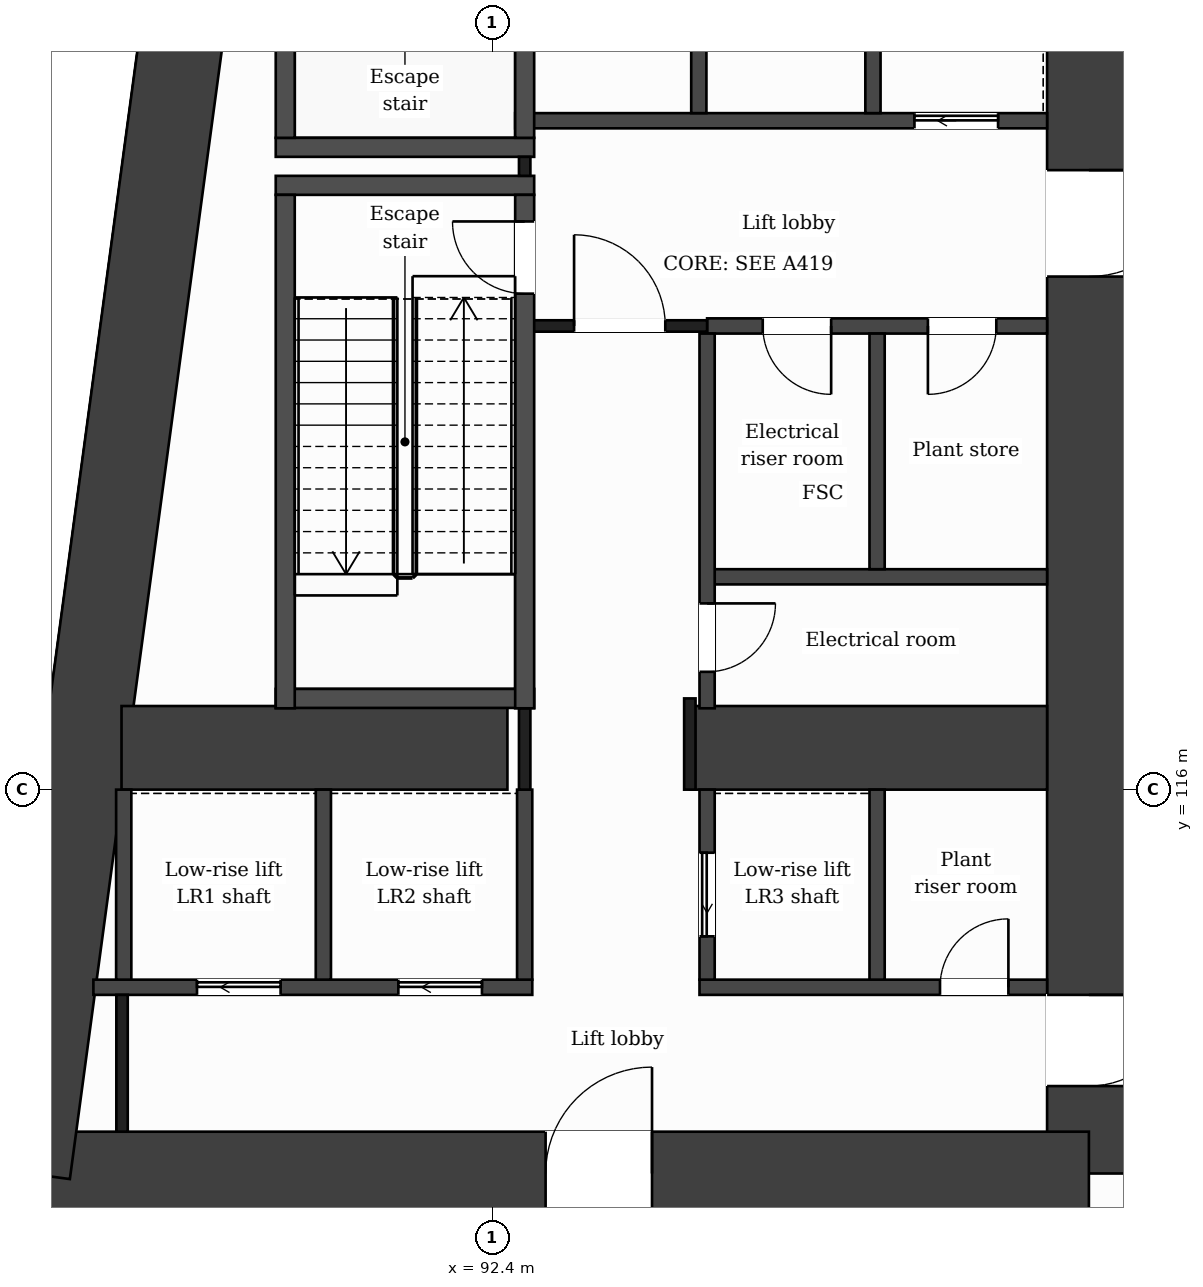
"""IFC4 building model, lengths in metres.
Left out: names, types, materials, properties, quantities, classifications, styles, units other than length and angle.
Written with IfcOpenShell. Run it as: python <this file> out.ifc"""

import sys

from ifc_helpers import new_model, si_unit, direction, frame, frame_2d, origin, place, context, subcontext, project, spatial, rectangle, extrude, element, fill, save


model = new_model("IFC4")
c1 = context("Model", 3, precision=1e-05, world=origin(), true_north=direction((0.0, 1.0)))
c2 = subcontext(c1, "Body", "Model", "MODEL_VIEW")
j1 = project(units=[si_unit("LENGTHUNIT", "METRE"), si_unit("PLANEANGLEUNIT", "RADIAN")], contexts=[c1])
p1 = place(None, origin())
s1 = spatial("IfcSite", under=j1, at=p1, CompositionType="ELEMENT")
p2 = place(p1, origin())
s2 = spatial("IfcBuilding", under=s1, at=p2, CompositionType="ELEMENT")
p3 = place(p2, frame((0.0, 0.0, 81.0)))
s3 = spatial("IfcBuildingStorey", under=s2, at=p3, CompositionType="ELEMENT", Elevation=81.0)
p4 = place(p3, frame((100.25, 131.85, 0.0), z_axis=(0.0, 0.0, 1.0), x_axis=(0.0, -1.0, 0.0)))
e1 = element("IfcWall", 1, at=p4, inside=s3, PredefinedType="SHEAR", context=c2, shape_type="SweptSolid", body=[
    extrude(rectangle(XDim=20.9, YDim=1.1, at=frame_2d((10.45, 0.0))), origin(), (0.0, 0.0, 1.0), 5.0),
])
p5 = place(p4, frame((18.55, 0.0, 0.0)))
e2 = element("IfcOpeningElement", 2, at=p5, cuts=e1, PredefinedType="OPENING", context=c2, shape_type="SweptSolid", body=[
    extrude(rectangle(XDim=1.2, YDim=2.1, at=frame_2d((0.6, 1.05))), frame((0.0, 0.56, 0.0), z_axis=(0.0, -1.0, 0.0), x_axis=(1.0, 0.0, 0.0)), (0.0, 0.0, 1.0), 1.12),
])
p6 = place(p4, frame((7.7, 0.0, 0.0)))
e3 = element("IfcOpeningElement", 3, at=p6, cuts=e1, PredefinedType="OPENING", context=c2, shape_type="SweptSolid", body=[
    extrude(rectangle(XDim=1.4, YDim=2.1, at=frame_2d((0.7, 1.05))), frame((0.0, 0.56, 0.0), z_axis=(0.0, -1.0, 0.0), x_axis=(1.0, 0.0, 0.0)), (0.0, 0.0, 1.0), 1.12),
])
p7 = place(p3, frame((100.25, 110.95, 0.0), z_axis=(0.0, 0.0, 1.0), x_axis=(-1.0, 0.0, 0.0)))
e4 = element("IfcWall", 4, at=p7, inside=s3, PredefinedType="SHEAR", context=c2, shape_type="SweptSolid", body=[
    extrude(rectangle(XDim=13.952, YDim=1.1, at=frame_2d((6.976, 0.0))), origin(), (0.0, 0.0, 1.0), 5.0),
])
p8 = place(p7, frame((5.748, 0.0, 0.0)))
e5 = element("IfcOpeningElement", 5, at=p8, cuts=e4, PredefinedType="OPENING", context=c2, shape_type="SweptSolid", body=[
    extrude(rectangle(XDim=1.4, YDim=2.1, at=frame_2d((0.7, 1.05))), frame((0.0, 0.56, 0.0), z_axis=(0.0, -1.0, 0.0), x_axis=(1.0, 0.0, 0.0)), (0.0, 0.0, 1.0), 1.12),
])
p9 = place(p3, frame((86.298, 110.95, 0.0), z_axis=(0.0, 0.0, 1.0), x_axis=(0.133400422634, 0.99106222168, 0.0)))
e6 = element("IfcWall", 6, at=p9, inside=s3, PredefinedType="SHEAR", context=c2, shape_type="SweptSolid", body=[
    extrude(rectangle(XDim=21.089, YDim=1.1, at=frame_2d((10.544, 0.0))), origin(), (0.0, 0.0, 1.0), 5.0),
])
p10 = place(p3, frame((87.523, 116.55, 0.0), z_axis=(0.0, 0.0, 1.0), x_axis=(1.0, 0.0, 0.0)))
e7 = element("IfcWall", 7, at=p10, inside=s3, PredefinedType="SHEAR", context=c2, shape_type="SweptSolid", body=[
    extrude(rectangle(XDim=5.077, YDim=1.1, at=frame_2d((2.539, 0.0))), origin(), (0.0, 0.0, 1.0), 5.0),
])
p11 = place(p3, frame((95.0, 116.55, 0.0), z_axis=(0.0, 0.0, 1.0), x_axis=(1.0, 0.0, 0.0)))
e8 = element("IfcWall", 8, at=p11, inside=s3, PredefinedType="SHEAR", context=c2, shape_type="SweptSolid", body=[
    extrude(rectangle(XDim=4.7, YDim=1.1, at=frame_2d((2.35, 0.0))), origin(), (0.0, 0.0, 1.0), 5.0),
])
p12 = place(p3, frame((87.153, 113.4, 0.0), z_axis=(0.0, 0.0, 1.0), x_axis=(1.0, 0.0, 0.0)))
e9 = element("IfcWall", 9, at=p12, inside=s3, PredefinedType="PARTITIONING", context=c2, shape_type="SweptSolid", body=[
    extrude(rectangle(XDim=5.774, YDim=0.2, at=frame_2d((2.887, 0.0))), origin(), (0.0, 0.0, 1.0), 4.55),
])
p13 = place(p12, frame((1.363, 0.0, 0.0)))
e10 = element("IfcOpeningElement", 10, at=p13, cuts=e9, PredefinedType="OPENING", context=c2, shape_type="SweptSolid", body=[
    extrude(rectangle(XDim=1.1, YDim=2.1, at=frame_2d((0.55, 1.05))), frame((0.0, 0.11, 0.0), z_axis=(0.0, -1.0, 0.0), x_axis=(1.0, 0.0, 0.0)), (0.0, 0.0, 1.0), 0.22),
])
p14 = place(p12, frame((4.012, 0.0, 0.0)))
e11 = element("IfcOpeningElement", 11, at=p14, cuts=e9, PredefinedType="OPENING", context=c2, shape_type="SweptSolid", body=[
    extrude(rectangle(XDim=1.1, YDim=2.1, at=frame_2d((0.55, 1.05))), frame((0.0, 0.11, 0.0), z_axis=(0.0, -1.0, 0.0), x_axis=(1.0, 0.0, 0.0)), (0.0, 0.0, 1.0), 0.22),
])
p15 = place(p3, frame((95.127, 113.4, 0.0), z_axis=(0.0, 0.0, 1.0), x_axis=(1.0, 0.0, 0.0)))
e12 = element("IfcWall", 12, at=p15, inside=s3, PredefinedType="PARTITIONING", context=c2, shape_type="SweptSolid", body=[
    extrude(rectangle(XDim=4.573, YDim=0.2, at=frame_2d((2.287, 0.0))), origin(), (0.0, 0.0, 1.0), 4.55),
])
p16 = place(p15, frame((3.164, 0.0, 0.0)))
e13 = element("IfcOpeningElement", 13, at=p16, cuts=e12, PredefinedType="OPENING", context=c2, shape_type="SweptSolid", body=[
    extrude(rectangle(XDim=0.9, YDim=2.1, at=frame_2d((0.45, 1.05))), frame((0.0, 0.11, 0.0), z_axis=(0.0, -1.0, 0.0), x_axis=(1.0, 0.0, 0.0)), (0.0, 0.0, 1.0), 0.22),
])
p17 = place(p3, frame((89.552, 117.2, 0.0), z_axis=(0.0, 0.0, 1.0), x_axis=(1.0, 0.0, 0.0)))
e14 = element("IfcWall", 14, at=p17, inside=s3, PredefinedType="PARTITIONING", context=c2, shape_type="SweptSolid", body=[
    extrude(rectangle(XDim=3.4, YDim=0.25, at=frame_2d((1.7, 0.0))), origin(), (0.0, 0.0, 1.0), 4.55),
])
p18 = place(p3, frame((95.227, 118.8, 0.0), z_axis=(0.0, 0.0, 1.0), x_axis=(1.0, 0.0, 0.0)))
e15 = element("IfcWall", 15, at=p18, inside=s3, PredefinedType="PARTITIONING", context=c2, shape_type="SweptSolid", body=[
    extrude(rectangle(XDim=4.473, YDim=0.2, at=frame_2d((2.236, 0.0))), origin(), (0.0, 0.0, 1.0), 4.55),
])
p19 = place(p3, frame((95.227, 122.1, 0.0), z_axis=(0.0, 0.0, 1.0), x_axis=(1.0, 0.0, 0.0)))
e16 = element("IfcWall", 16, at=p19, inside=s3, PredefinedType="PARTITIONING", context=c2, shape_type="SweptSolid", body=[
    extrude(rectangle(XDim=4.473, YDim=0.2, at=frame_2d((2.236, 0.0))), origin(), (0.0, 0.0, 1.0), 4.55),
])
p20 = place(p19, frame((0.732, 0.0, 0.0)))
e17 = element("IfcOpeningElement", 17, at=p20, cuts=e16, PredefinedType="OPENING", context=c2, shape_type="SweptSolid", body=[
    extrude(rectangle(XDim=0.9, YDim=2.1, at=frame_2d((0.45, 1.05))), frame((0.0, 0.11, 0.0), z_axis=(0.0, -1.0, 0.0), x_axis=(1.0, 0.0, 0.0)), (0.0, 0.0, 1.0), 0.22),
])
p21 = place(p19, frame((2.905, 0.0, 0.0)))
e18 = element("IfcOpeningElement", 18, at=p21, cuts=e16, PredefinedType="OPENING", context=c2, shape_type="SweptSolid", body=[
    extrude(rectangle(XDim=0.9, YDim=2.1, at=frame_2d((0.45, 1.05))), frame((0.0, 0.11, 0.0), z_axis=(0.0, -1.0, 0.0), x_axis=(1.0, 0.0, 0.0)), (0.0, 0.0, 1.0), 0.22),
])
p22 = place(p3, frame((92.827, 122.1, 0.0), z_axis=(0.0, 0.0, 1.0), x_axis=(1.0, 0.0, 0.0)))
e19 = element("IfcWall", 19, at=p22, inside=s3, PredefinedType="PARTITIONING", context=c2, shape_type="SweptSolid", body=[
    extrude(rectangle(XDim=2.4, YDim=0.15, at=frame_2d((1.2, 0.0))), origin(), (0.0, 0.0, 1.0), 4.55),
])
p23 = place(p22, frame((0.65, 0.0, 0.0)))
e20 = element("IfcOpeningElement", 20, at=p23, cuts=e19, PredefinedType="OPENING", context=c2, shape_type="SweptSolid", body=[
    extrude(rectangle(XDim=1.2, YDim=2.1, at=frame_2d((0.6, 1.05))), frame((0.0, 0.085, 0.0), z_axis=(0.0, -1.0, 0.0), x_axis=(1.0, 0.0, 0.0)), (0.0, 0.0, 1.0), 0.17),
])
for number, where, z_axis, x_axis in (
    (21, (89.552, 123.95, 0.0), (0.0, 0.0, 1.0), (1.0, 0.0, 0.0)),
    (22, (89.552, 124.45, 0.0), (0.0, 0.0, 1.0), (1.0, 0.0, 0.0)),
):
    element("IfcWall", number, at=place(p3, frame(where, z_axis=z_axis, x_axis=x_axis)), inside=s3, PredefinedType="PARTITIONING", context=c2, shape_type="SweptSolid", body=[
        extrude(rectangle(XDim=3.4, YDim=0.25, at=frame_2d((1.7, 0.0))), origin(), (0.0, 0.0, 1.0), 4.55),
    ])
p24 = place(p3, frame((92.702, 124.8, 0.0), z_axis=(0.0, 0.0, 1.0), x_axis=(1.0, 0.0, 0.0)))
e23 = element("IfcWall", 23, at=p24, inside=s3, PredefinedType="PARTITIONING", context=c2, shape_type="SweptSolid", body=[
    extrude(rectangle(XDim=6.998, YDim=0.2, at=frame_2d((3.499, 0.0))), origin(), (0.0, 0.0, 1.0), 4.55),
])
p25 = place(p24, frame((5.253, 0.0, 0.0)))
e24 = element("IfcOpeningElement", 24, at=p25, cuts=e23, PredefinedType="OPENING", context=c2, shape_type="SweptSolid", body=[
    extrude(rectangle(XDim=1.1, YDim=2.1, at=frame_2d((0.55, 1.05))), frame((0.0, 0.11, 0.0), z_axis=(0.0, -1.0, 0.0), x_axis=(1.0, 0.0, 0.0)), (0.0, 0.0, 1.0), 0.22),
])
p26 = place(p3, frame((87.552, 113.5, 0.0), z_axis=(0.0, 0.0, 1.0), x_axis=(0.0, 1.0, 0.0)))
e25 = element("IfcWall", 25, at=p26, inside=s3, PredefinedType="PARTITIONING", context=c2, shape_type="SweptSolid", body=[
    extrude(rectangle(XDim=2.5, YDim=0.2, at=frame_2d((1.25, 0.0))), origin(), (0.0, 0.0, 1.0), 4.55),
])
p27 = place(p3, frame((87.53, 111.5, 0.0), z_axis=(0.0, 0.0, 1.0), x_axis=(0.0, 1.0, 0.0)))
e26 = element("IfcWall", 26, at=p27, inside=s3, PredefinedType="PARTITIONING", context=c2, shape_type="SweptSolid", body=[
    extrude(rectangle(XDim=1.8, YDim=0.15, at=frame_2d((0.9, 0.0))), origin(), (0.0, 0.0, 1.0), 4.55),
])
p28 = place(p3, frame((89.677, 117.07, 0.0), z_axis=(0.0, 0.0, 1.0), x_axis=(0.0, 1.0, 0.0)))
e27 = element("IfcWall", 27, at=p28, inside=s3, PredefinedType="PARTITIONING", context=c2, shape_type="SweptSolid", body=[
    extrude(rectangle(XDim=6.755, YDim=0.25, at=frame_2d((3.377, 0.0))), origin(), (0.0, 0.0, 1.0), 4.55),
])
p29 = place(p3, frame((89.677, 124.575, 0.0), z_axis=(0.0, 0.0, 1.0), x_axis=(0.0, 1.0, 0.0)))
e28 = element("IfcWall", 28, at=p29, inside=s3, PredefinedType="PARTITIONING", context=c2, shape_type="SweptSolid", body=[
    extrude(rectangle(XDim=6.5, YDim=0.25, at=frame_2d((3.25, 0.0))), origin(), (0.0, 0.0, 1.0), 4.55),
])
for number, where, z_axis, x_axis in (
    (29, (90.178, 113.5, 0.0), (0.0, 0.0, 1.0), (0.0, 1.0, 0.0)),
    (30, (92.827, 113.5, 0.0), (0.0, 0.0, 1.0), (0.0, 1.0, 0.0)),
):
    element("IfcWall", number, at=place(p3, frame(where, z_axis=z_axis, x_axis=x_axis)), inside=s3, PredefinedType="PARTITIONING", context=c2, shape_type="SweptSolid", body=[
        extrude(rectangle(XDim=2.5, YDim=0.2, at=frame_2d((1.25, 0.0))), origin(), (0.0, 0.0, 1.0), 4.55),
    ])
p30 = place(p3, frame((92.827, 116.0, 0.0), z_axis=(0.0, 0.0, 1.0), x_axis=(0.0, 1.0, 0.0)))
e31 = element("IfcWall", 31, at=p30, inside=s3, PredefinedType="PARTITIONING", context=c2, shape_type="SweptSolid", body=[
    extrude(rectangle(XDim=1.07, YDim=0.15, at=frame_2d((0.535, 0.0))), origin(), (0.0, 0.0, 1.0), 4.55),
])
p31 = place(p3, frame((92.827, 124.075, 0.0), z_axis=(0.0, 0.0, 1.0), x_axis=(0.0, 1.0, 0.0)))
e32 = element("IfcWall", 32, at=p31, inside=s3, PredefinedType="PARTITIONING", context=c2, shape_type="SweptSolid", body=[
    extrude(rectangle(XDim=0.25, YDim=0.15, at=frame_2d((0.125, 0.0))), origin(), (0.0, 0.0, 1.0), 4.55),
])
p32 = place(p3, frame((92.827, 117.07, 0.0), z_axis=(0.0, 0.0, 1.0), x_axis=(0.0, 1.0, 0.0)))
e33 = element("IfcWall", 33, at=p32, inside=s3, PredefinedType="PARTITIONING", context=c2, shape_type="SweptSolid", body=[
    extrude(rectangle(XDim=6.755, YDim=0.25, at=frame_2d((3.377, 0.0))), origin(), (0.0, 0.0, 1.0), 4.55),
])
p33 = place(p32, frame((5.455, 0.0, 0.0)))
e34 = element("IfcOpeningElement", 34, at=p33, cuts=e33, PredefinedType="OPENING", context=c2, shape_type="SweptSolid", body=[
    extrude(rectangle(XDim=0.95, YDim=2.1, at=frame_2d((0.475, 1.05))), frame((0.0, 0.135, 0.0), z_axis=(0.0, -1.0, 0.0), x_axis=(1.0, 0.0, 0.0)), (0.0, 0.0, 1.0), 0.27),
])
p34 = place(p3, frame((92.827, 124.575, 0.0), z_axis=(0.0, 0.0, 1.0), x_axis=(0.0, 1.0, 0.0)))
e35 = element("IfcWall", 35, at=p34, inside=s3, PredefinedType="PARTITIONING", context=c2, shape_type="SweptSolid", body=[
    extrude(rectangle(XDim=6.755, YDim=0.25, at=frame_2d((3.377, 0.0))), origin(), (0.0, 0.0, 1.0), 4.55),
])
p35 = place(p34, frame((5.325, 0.0, 0.0)))
e36 = element("IfcOpeningElement", 36, at=p35, cuts=e35, PredefinedType="OPENING", context=c2, shape_type="SweptSolid", body=[
    extrude(rectangle(XDim=1.0, YDim=2.1, at=frame_2d((0.5, 1.05))), frame((0.0, 0.135, 0.0), z_axis=(0.0, -1.0, 0.0), x_axis=(1.0, 0.0, 0.0)), (0.0, 0.0, 1.0), 0.27),
])
p36 = place(p3, frame((95.0, 116.0, 0.0), z_axis=(0.0, 0.0, 1.0), x_axis=(0.0, 1.0, 0.0)))
e37 = element("IfcWall", 37, at=p36, inside=s3, PredefinedType="PARTITIONING", context=c2, shape_type="SweptSolid", body=[
    extrude(rectangle(XDim=1.2, YDim=0.15, at=frame_2d((0.6, 0.0))), origin(), (0.0, 0.0, 1.0), 4.55),
])
p37 = place(p3, frame((95.118, 124.9, 0.0), z_axis=(0.0, 0.0, 1.0), x_axis=(0.0, 1.0, 0.0)))
e38 = element("IfcWall", 38, at=p37, inside=s3, PredefinedType="PARTITIONING", context=c2, shape_type="SweptSolid", body=[
    extrude(rectangle(XDim=3.1, YDim=0.2, at=frame_2d((1.55, 0.0))), origin(), (0.0, 0.0, 1.0), 4.55),
])
p38 = place(p3, frame((95.227, 113.5, 0.0), z_axis=(0.0, 0.0, 1.0), x_axis=(0.0, 1.0, 0.0)))
e39 = element("IfcWall", 39, at=p38, inside=s3, PredefinedType="PARTITIONING", context=c2, shape_type="SweptSolid", body=[
    extrude(rectangle(XDim=2.5, YDim=0.2, at=frame_2d((1.25, 0.0))), origin(), (0.0, 0.0, 1.0), 4.55),
])
p39 = place(p38, frame((0.57, 0.0, 0.0)))
e40 = element("IfcOpeningElement", 40, at=p39, cuts=e39, PredefinedType="OPENING", context=c2, shape_type="SweptSolid", body=[
    extrude(rectangle(XDim=1.1, YDim=2.1, at=frame_2d((0.55, 1.05))), frame((0.0, 0.11, 0.0), z_axis=(0.0, -1.0, 0.0), x_axis=(1.0, 0.0, 0.0)), (0.0, 0.0, 1.0), 0.22),
])
p40 = place(p3, frame((95.227, 117.07, 0.0), z_axis=(0.0, 0.0, 1.0), x_axis=(0.0, 1.0, 0.0)))
e41 = element("IfcWall", 41, at=p40, inside=s3, PredefinedType="PARTITIONING", context=c2, shape_type="SweptSolid", body=[
    extrude(rectangle(XDim=4.93, YDim=0.2, at=frame_2d((2.465, 0.0))), origin(), (0.0, 0.0, 1.0), 4.55),
])
p41 = place(p40, frame((0.48, 0.0, 0.0)))
e42 = element("IfcOpeningElement", 42, at=p41, cuts=e41, PredefinedType="OPENING", context=c2, shape_type="SweptSolid", body=[
    extrude(rectangle(XDim=0.9, YDim=2.1, at=frame_2d((0.45, 1.05))), frame((0.0, 0.11, 0.0), z_axis=(0.0, -1.0, 0.0), x_axis=(1.0, 0.0, 0.0)), (0.0, 0.0, 1.0), 0.22),
])
p42 = place(p3, frame((97.409, 124.9, 0.0), z_axis=(0.0, 0.0, 1.0), x_axis=(0.0, 1.0, 0.0)))
e43 = element("IfcWall", 43, at=p42, inside=s3, PredefinedType="PARTITIONING", context=c2, shape_type="SweptSolid", body=[
    extrude(rectangle(XDim=3.1, YDim=0.2, at=frame_2d((1.55, 0.0))), origin(), (0.0, 0.0, 1.0), 4.55),
])
p43 = place(p3, frame((97.463, 113.5, 0.0), z_axis=(0.0, 0.0, 1.0), x_axis=(0.0, 1.0, 0.0)))
e44 = element("IfcWall", 44, at=p43, inside=s3, PredefinedType="PARTITIONING", context=c2, shape_type="SweptSolid", body=[
    extrude(rectangle(XDim=2.5, YDim=0.2, at=frame_2d((1.25, 0.0))), origin(), (0.0, 0.0, 1.0), 4.55),
])
p44 = place(p3, frame((97.463, 118.9, 0.0), z_axis=(0.0, 0.0, 1.0), x_axis=(0.0, 1.0, 0.0)))
e45 = element("IfcWall", 45, at=p44, inside=s3, PredefinedType="PARTITIONING", context=c2, shape_type="SweptSolid", body=[
    extrude(rectangle(XDim=3.1, YDim=0.2, at=frame_2d((1.55, 0.0))), origin(), (0.0, 0.0, 1.0), 4.55),
])
p45 = place(p23, origin())
e46 = element("IfcDoor", 46, at=p45, inside=s3, OperationType="SINGLE_SWING_LEFT", PredefinedType="DOOR", context=c2, shape_type="SweptSolid", body=[
    extrude(rectangle(XDim=1.2, YDim=2.1, at=frame_2d((0.6, 1.05))), frame((0.0, 0.025, 0.0), z_axis=(0.0, -1.0, 0.0), x_axis=(1.0, 0.0, 0.0)), (0.0, 0.0, 1.0), 0.05),
])
fill(e20, e46)
p46 = place(p25, origin())
e47 = element("IfcDoor", 47, at=p46, inside=s3, OperationType="SLIDING_TO_LEFT", PredefinedType="DOOR", context=c2, shape_type="SweptSolid", body=[
    extrude(rectangle(XDim=1.1, YDim=2.1, at=frame_2d((0.55, 1.05))), frame((0.0, 0.025, 0.0), z_axis=(0.0, -1.0, 0.0), x_axis=(1.0, 0.0, 0.0)), (0.0, 0.0, 1.0), 0.05),
])
fill(e24, e47)
p47 = place(p20, origin())
e48 = element("IfcDoor", 48, at=p47, inside=s3, OperationType="SINGLE_SWING_RIGHT", PredefinedType="DOOR", context=c2, shape_type="SweptSolid", body=[
    extrude(rectangle(XDim=0.9, YDim=2.1, at=frame_2d((0.45, 1.05))), frame((0.0, 0.025, 0.0), z_axis=(0.0, -1.0, 0.0), x_axis=(1.0, 0.0, 0.0)), (0.0, 0.0, 1.0), 0.05),
])
fill(e17, e48)
p48 = place(p21, origin())
e49 = element("IfcDoor", 49, at=p48, inside=s3, OperationType="SINGLE_SWING_LEFT", PredefinedType="DOOR", context=c2, shape_type="SweptSolid", body=[
    extrude(rectangle(XDim=0.9, YDim=2.1, at=frame_2d((0.45, 1.05))), frame((0.0, 0.025, 0.0), z_axis=(0.0, -1.0, 0.0), x_axis=(1.0, 0.0, 0.0)), (0.0, 0.0, 1.0), 0.05),
])
fill(e18, e49)
p49 = place(p33, origin())
e50 = element("IfcDoor", 50, at=p49, inside=s3, OperationType="SINGLE_SWING_RIGHT", PredefinedType="DOOR", context=c2, shape_type="SweptSolid", body=[
    extrude(rectangle(XDim=0.95, YDim=2.1, at=frame_2d((0.475, 1.05))), frame((0.0, 0.025, 0.0), z_axis=(0.0, -1.0, 0.0), x_axis=(1.0, 0.0, 0.0)), (0.0, 0.0, 1.0), 0.05),
])
fill(e34, e50)
p50 = place(p41, origin())
e51 = element("IfcDoor", 51, at=p50, inside=s3, OperationType="SINGLE_SWING_RIGHT", PredefinedType="DOOR", context=c2, shape_type="SweptSolid", body=[
    extrude(rectangle(XDim=0.9, YDim=2.1, at=frame_2d((0.45, 1.05))), frame((0.0, 0.025, 0.0), z_axis=(0.0, -1.0, 0.0), x_axis=(1.0, 0.0, 0.0)), (0.0, 0.0, 1.0), 0.05),
])
fill(e42, e51)
p51 = place(p13, origin())
e52 = element("IfcDoor", 52, at=p51, inside=s3, OperationType="SLIDING_TO_LEFT", PredefinedType="DOOR", context=c2, shape_type="SweptSolid", body=[
    extrude(rectangle(XDim=1.1, YDim=2.1, at=frame_2d((0.55, 1.05))), frame((0.0, 0.025, 0.0), z_axis=(0.0, -1.0, 0.0), x_axis=(1.0, 0.0, 0.0)), (0.0, 0.0, 1.0), 0.05),
])
fill(e10, e52)
p52 = place(p14, origin())
e53 = element("IfcDoor", 53, at=p52, inside=s3, OperationType="SLIDING_TO_LEFT", PredefinedType="DOOR", context=c2, shape_type="SweptSolid", body=[
    extrude(rectangle(XDim=1.1, YDim=2.1, at=frame_2d((0.55, 1.05))), frame((0.0, 0.025, 0.0), z_axis=(0.0, -1.0, 0.0), x_axis=(1.0, 0.0, 0.0)), (0.0, 0.0, 1.0), 0.05),
])
fill(e11, e53)
p53 = place(p39, origin())
e54 = element("IfcDoor", 54, at=p53, inside=s3, OperationType="SLIDING_TO_LEFT", PredefinedType="DOOR", context=c2, shape_type="SweptSolid", body=[
    extrude(rectangle(XDim=1.1, YDim=2.1, at=frame_2d((0.55, 1.05))), frame((0.0, 0.025, 0.0), z_axis=(0.0, -1.0, 0.0), x_axis=(1.0, 0.0, 0.0)), (0.0, 0.0, 1.0), 0.05),
])
fill(e40, e54)
p54 = place(p16, origin())
e55 = element("IfcDoor", 55, at=p54, inside=s3, OperationType="SINGLE_SWING_RIGHT", PredefinedType="DOOR", context=c2, shape_type="SweptSolid", body=[
    extrude(rectangle(XDim=0.9, YDim=2.1, at=frame_2d((0.45, 1.05))), frame((0.0, 0.025, 0.0), z_axis=(0.0, -1.0, 0.0), x_axis=(1.0, 0.0, 0.0)), (0.0, 0.0, 1.0), 0.05),
])
fill(e13, e55)
p55 = place(p5, origin())
e56 = element("IfcDoor", 56, at=p55, inside=s3, OperationType="SINGLE_SWING_LEFT", PredefinedType="DOOR", context=c2, shape_type="SweptSolid", body=[
    extrude(rectangle(XDim=1.2, YDim=2.1, at=frame_2d((0.6, 1.05))), frame((0.0, 0.025, 0.0), z_axis=(0.0, -1.0, 0.0), x_axis=(1.0, 0.0, 0.0)), (0.0, 0.0, 1.0), 0.05),
])
fill(e2, e56)
p56 = place(p8, origin())
e57 = element("IfcDoor", 57, at=p56, inside=s3, OperationType="SINGLE_SWING_LEFT", PredefinedType="DOOR", context=c2, shape_type="SweptSolid", body=[
    extrude(rectangle(XDim=1.4, YDim=2.1, at=frame_2d((0.7, 1.05))), frame((0.0, 0.025, 0.0), z_axis=(0.0, -1.0, 0.0), x_axis=(1.0, 0.0, 0.0)), (0.0, 0.0, 1.0), 0.05),
])
fill(e5, e57)
p57 = place(p6, origin())
e58 = element("IfcDoor", 58, at=p57, inside=s3, OperationType="SINGLE_SWING_LEFT", PredefinedType="DOOR", context=c2, shape_type="SweptSolid", body=[
    extrude(rectangle(XDim=1.4, YDim=2.1, at=frame_2d((0.7, 1.05))), frame((0.0, 0.025, 0.0), z_axis=(0.0, -1.0, 0.0), x_axis=(1.0, 0.0, 0.0)), (0.0, 0.0, 1.0), 0.05),
])
fill(e3, e58)
save(model, sys.argv[1])
